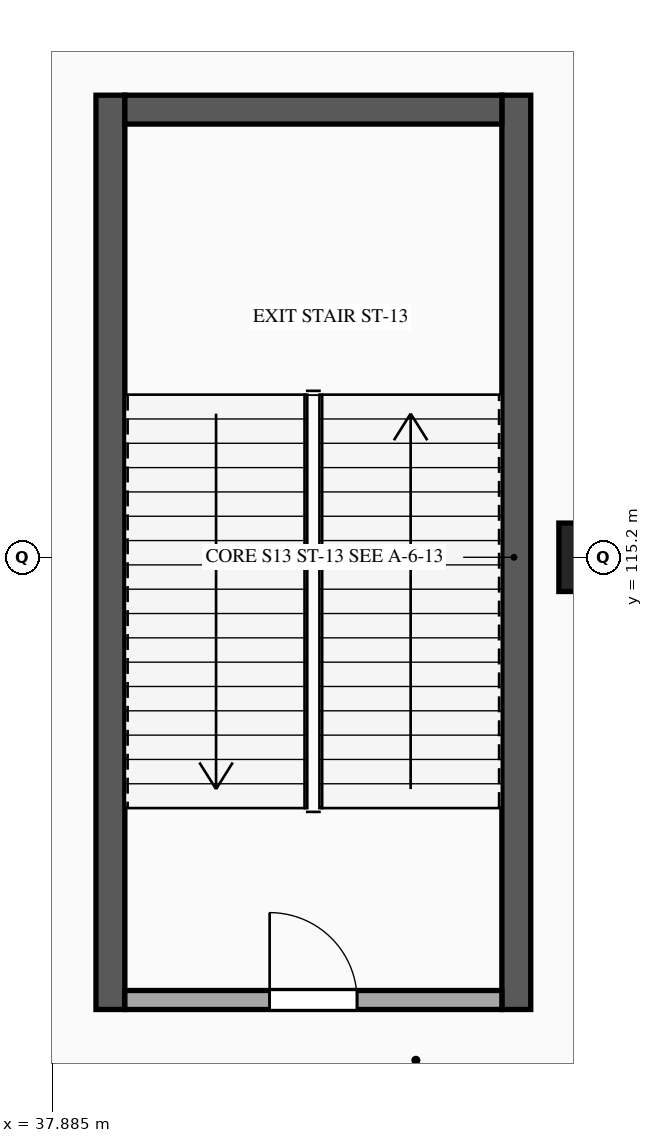
"""IFC4 building model, lengths in metres.
Left out: names, types, materials, properties, quantities, classifications, styles, units other than length and angle.
Written with IfcOpenShell. Run it as: python <this file> out.ifc"""

import sys

from ifc_helpers import new_model, si_unit, direction, frame, frame_2d, origin, origin_2d, place, context, subcontext, project, spatial, rectangle, extrude, element, fill, save


model = new_model("IFC4")
c1 = context("Model", 3, precision=1e-05, world=origin(), true_north=direction((0.0, 1.0)))
c2 = subcontext(c1, "Body", "Model", "MODEL_VIEW")
j1 = project(units=[si_unit("LENGTHUNIT", "METRE"), si_unit("PLANEANGLEUNIT", "RADIAN")], contexts=[c1])
p1 = place(None, origin())
s1 = spatial("IfcSite", under=j1, at=p1, CompositionType="ELEMENT")
p2 = place(p1, origin())
s2 = spatial("IfcBuilding", under=s1, at=p2, CompositionType="ELEMENT")
p3 = place(p2, frame((0.0, 0.0, -5.4)))
s3 = spatial("IfcBuildingStorey", under=s2, at=p3, CompositionType="ELEMENT", Elevation=-5.4)
p4 = place(p3, frame((45.0, 115.2, 0.0), z_axis=(0.0, 0.0, 1.0), x_axis=(1.0, 0.0, 0.0)))
e1 = element("IfcColumn", 1, at=p4, inside=s3, PredefinedType="COLUMN", context=c2, shape_type="SweptSolid", body=[
    extrude(rectangle(XDim=0.9, YDim=0.9, at=origin_2d()), origin(), (0.0, 0.0, 1.0), 5.4),
])
for number, where, z_axis, x_axis in (
    (2, (38.65, 109.25, 0.0), (0.0, 0.0, 1.0), (0.0, 1.0, 0.0)),
    (3, (43.99, 121.28, 0.0), (0.0, 0.0, 1.0), (0.0, -1.0, 0.0)),
):
    element("IfcWall", number, at=place(p3, frame(where, z_axis=z_axis, x_axis=x_axis)), inside=s3, PredefinedType="SHEAR", context=c2, shape_type="SweptSolid", body=[
        extrude(rectangle(XDim=12.03, YDim=0.38, at=frame_2d((6.015, 0.0))), origin(), (0.0, 0.0, 1.0), 5.08),
    ])
p5 = place(p3, frame((38.84, 121.09, 0.0), z_axis=(0.0, 0.0, 1.0), x_axis=(1.0, 0.0, 0.0)))
e4 = element("IfcWall", 4, at=p5, inside=s3, PredefinedType="SHEAR", context=c2, shape_type="SweptSolid", body=[
    extrude(rectangle(XDim=4.96, YDim=0.38, at=frame_2d((2.48, 0.0))), origin(), (0.0, 0.0, 1.0), 5.08),
])
p6 = place(p3, frame((38.84, 109.375, 0.0), z_axis=(0.0, 0.0, 1.0), x_axis=(1.0, 0.0, 0.0)))
e5 = element("IfcWall", 5, at=p6, inside=s3, PredefinedType="STANDARD", context=c2, shape_type="SweptSolid", body=[
    extrude(rectangle(XDim=4.96, YDim=0.25, at=frame_2d((2.48, 0.0))), origin(), (0.0, 0.0, 1.0), 4.95),
])
p7 = place(p6, frame((1.905, 0.0, 0.0)))
e6 = element("IfcOpeningElement", 6, at=p7, cuts=e5, PredefinedType="OPENING", context=c2, shape_type="SweptSolid", body=[
    extrude(rectangle(XDim=1.15, YDim=2.2, at=frame_2d((0.575, 1.1))), frame((0.0, 0.135, 0.0), z_axis=(0.0, -1.0, 0.0), x_axis=(1.0, 0.0, 0.0)), (0.0, 0.0, 1.0), 0.27),
])
p8 = place(p7, origin())
e7 = element("IfcDoor", 7, at=p8, inside=s3, OperationType="SINGLE_SWING_LEFT", PredefinedType="DOOR", context=c2, shape_type="SweptSolid", body=[
    extrude(rectangle(XDim=1.15, YDim=2.2, at=frame_2d((0.575, 1.1))), frame((0.0, 0.025, 0.0), z_axis=(0.0, -1.0, 0.0), x_axis=(1.0, 0.0, 0.0)), (0.0, 0.0, 1.0), 0.05),
])
fill(e6, e7)
save(model, sys.argv[1])
